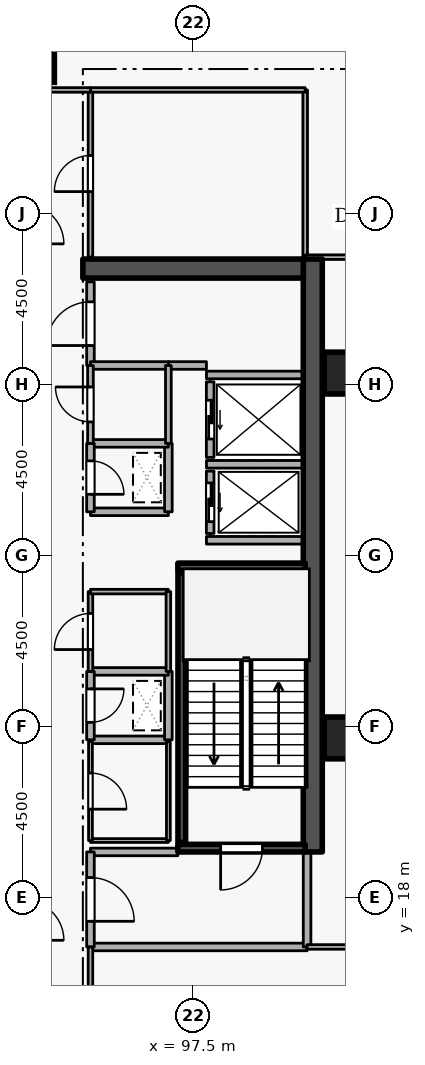
"""IFC4 building model, lengths in metres.
Left out: names, types, materials, properties, quantities, classifications, styles, units other than length and angle.
Written with IfcOpenShell. Run it as: python <this file> out.ifc"""

import sys

from ifc_helpers import new_model, si_unit, direction, frame, frame_2d, origin, origin_2d, place, context, subcontext, project, spatial, rectangle, extrude, element, fill, save


model = new_model("IFC4")
c1 = context("Model", 3, precision=1e-05, world=origin(), true_north=direction((0.0, 1.0)))
c2 = subcontext(c1, "Body", "Model", "MODEL_VIEW")
j1 = project(units=[si_unit("LENGTHUNIT", "METRE"), si_unit("PLANEANGLEUNIT", "RADIAN")], contexts=[c1])
p1 = place(None, origin())
s1 = spatial("IfcSite", under=j1, at=p1, CompositionType="ELEMENT")
p2 = place(p1, origin())
s2 = spatial("IfcBuilding", under=s1, at=p2, CompositionType="ELEMENT")
p3 = place(p2, frame((0.0, 0.0, 174.3)))
s3 = spatial("IfcBuildingStorey", under=s2, at=p3, CompositionType="ELEMENT", Elevation=174.3)
p4 = place(p3, frame((100.65, 19.2, 0.0), z_axis=(0.0, 0.0, 1.0), x_axis=(0.0, 1.0, 0.0)))
e1 = element("IfcWall", 1, at=p4, inside=s3, PredefinedType="SHEAR", context=c2, shape_type="SweptSolid", body=[
    extrude(rectangle(XDim=15.6, YDim=0.5, at=frame_2d((7.8, 0.0))), origin(), (0.0, 0.0, 1.0), 4.2),
])
p5 = place(p3, frame((94.6, 34.55, 0.0), z_axis=(0.0, 0.0, 1.0), x_axis=(1.0, 0.0, 0.0)))
e2 = element("IfcWall", 2, at=p5, inside=s3, PredefinedType="SHEAR", context=c2, shape_type="SweptSolid", body=[
    extrude(rectangle(XDim=5.8, YDim=0.5, at=frame_2d((2.9, 0.0))), origin(), (0.0, 0.0, 1.0), 4.2),
])
for number, where, z_axis, x_axis in (
    (3, (93.3, 40.0, 0.0), (0.0, 0.0, 1.0), (1.0, 0.0, 0.0)),
    (4, (101.5, 22.2, 0.0), (0.0, 0.0, 1.0), (1.0, 0.0, 0.0)),
    (5, (101.5, 31.8, 0.0), (0.0, 0.0, 1.0), (1.0, 0.0, 0.0)),
):
    element("IfcColumn", number, at=place(p3, frame(where, z_axis=z_axis, x_axis=x_axis)), inside=s3, PredefinedType="COLUMN", context=c2, shape_type="SweptSolid", body=[
        extrude(rectangle(XDim=1.1, YDim=1.1, at=origin_2d()), origin(), (0.0, 0.0, 1.0), 4.2),
    ])
p6 = place(p3, frame((97.95, 29.22, 0.0), z_axis=(0.0, 0.0, 1.0), x_axis=(0.0, -1.0, 0.0)))
e6 = element("IfcWall", 6, at=p6, inside=s3, PredefinedType="STANDARD", context=c2, shape_type="SweptSolid", body=[
    extrude(rectangle(XDim=1.64, YDim=0.2, at=frame_2d((0.82, 0.0))), origin(), (0.0, 0.0, 1.0), 3.94),
])
p7 = place(p6, frame((0.31, 0.0, 0.0)))
e7 = element("IfcOpeningElement", 7, at=p7, cuts=e6, PredefinedType="OPENING", context=c2, shape_type="SweptSolid", body=[
    extrude(rectangle(XDim=1.02, YDim=2.06, at=frame_2d((0.51, 1.03))), frame((0.0, 0.11, 0.0), z_axis=(0.0, -1.0, 0.0), x_axis=(1.0, 0.0, 0.0)), (0.0, 0.0, 1.0), 0.22),
])
p8 = place(p3, frame((97.95, 31.57, 0.0), z_axis=(0.0, 0.0, 1.0), x_axis=(0.0, -1.0, 0.0)))
e8 = element("IfcWall", 8, at=p8, inside=s3, PredefinedType="STANDARD", context=c2, shape_type="SweptSolid", body=[
    extrude(rectangle(XDim=1.99, YDim=0.2, at=frame_2d((0.995, 0.0))), origin(), (0.0, 0.0, 1.0), 3.94),
])
p9 = place(p8, frame((0.485, 0.0, 0.0)))
e9 = element("IfcOpeningElement", 9, at=p9, cuts=e8, PredefinedType="OPENING", context=c2, shape_type="SweptSolid", body=[
    extrude(rectangle(XDim=1.02, YDim=2.06, at=frame_2d((0.51, 1.03))), frame((0.0, 0.11, 0.0), z_axis=(0.0, -1.0, 0.0), x_axis=(1.0, 0.0, 0.0)), (0.0, 0.0, 1.0), 0.22),
])
for number, where, z_axis, x_axis in (
    (10, (97.852, 29.4, 0.0), (0.0, 0.0, 1.0), (1.0, 0.0, 0.0)),
    (11, (97.852, 27.4, 0.0), (0.0, 0.0, 1.0), (1.0, 0.0, 0.0)),
    (12, (97.852, 31.75, 0.0), (0.0, 0.0, 1.0), (1.0, 0.0, 0.0)),
):
    element("IfcWall", number, at=place(p3, frame(where, z_axis=z_axis, x_axis=x_axis)), inside=s3, PredefinedType="STANDARD", context=c2, shape_type="SweptSolid", body=[
        extrude(rectangle(XDim=2.536, YDim=0.2, at=frame_2d((1.268, 0.0))), origin(), (0.0, 0.0, 1.0), 3.94),
    ])
p10 = place(p3, frame((100.45, 19.3, 0.0), z_axis=(0.0, 0.0, 1.0), x_axis=(-1.0, 0.0, 0.0)))
e13 = element("IfcWall", 13, at=p10, inside=s3, PredefinedType="SHEAR", context=c2, shape_type="SweptSolid", body=[
    extrude(rectangle(XDim=3.35, YDim=0.2, at=frame_2d((1.675, 0.0))), origin(), (0.0, 0.0, 1.0), 4.2),
])
p11 = place(p10, frame((1.125, 0.0, 0.0)))
e14 = element("IfcOpeningElement", 14, at=p11, cuts=e13, PredefinedType="OPENING", context=c2, shape_type="SweptSolid", body=[
    extrude(rectangle(XDim=1.1, YDim=2.1, at=frame_2d((0.55, 1.05))), frame((0.0, 0.11, 0.0), z_axis=(0.0, -1.0, 0.0), x_axis=(1.0, 0.0, 0.0)), (0.0, 0.0, 1.0), 0.22),
])
p12 = place(p3, frame((97.1, 26.7, 0.0), z_axis=(0.0, 0.0, 1.0), x_axis=(1.0, 0.0, 0.0)))
e15 = element("IfcWall", 15, at=p12, inside=s3, PredefinedType="SHEAR", context=c2, shape_type="SweptSolid", body=[
    extrude(rectangle(XDim=3.35, YDim=0.2, at=frame_2d((1.675, 0.0))), origin(), (0.0, 0.0, 1.0), 4.2),
])
p13 = place(p3, frame((97.203, 26.55, 0.0), z_axis=(0.0, 0.0, 1.0), x_axis=(0.0, -1.0, 0.0)))
e16 = element("IfcWall", 16, at=p13, inside=s3, PredefinedType="SHEAR", context=c2, shape_type="SweptSolid", body=[
    extrude(rectangle(XDim=7.1, YDim=0.2, at=frame_2d((3.55, 0.0))), origin(), (0.0, 0.0, 1.0), 4.2),
])
p14 = place(p3, frame((94.8, 16.7, 0.0), z_axis=(0.0, 0.0, 1.0), x_axis=(1.0, 0.0, 0.0)))
e17 = element("IfcWall", 17, at=p14, inside=s3, PredefinedType="STANDARD", context=c2, shape_type="SweptSolid", body=[
    extrude(rectangle(XDim=5.7, YDim=0.2, at=frame_2d((2.85, 0.0))), origin(), (0.0, 0.0, 1.0), 3.94),
])
p15 = place(p3, frame((100.5, 16.7, 0.0), z_axis=(0.0, 0.0, 1.0), x_axis=(0.0, 1.0, 0.0)))
e18 = element("IfcWall", 18, at=p15, inside=s3, PredefinedType="STANDARD", context=c2, shape_type="SweptSolid", body=[
    extrude(rectangle(XDim=2.5, YDim=0.2, at=frame_2d((1.25, 0.0))), origin(), (0.0, 0.0, 1.0), 3.94),
])
p16 = place(p3, frame((97.1, 19.2, 0.0), z_axis=(0.0, 0.0, 1.0), x_axis=(-1.0, 0.0, 0.0)))
e19 = element("IfcWall", 19, at=p16, inside=s3, PredefinedType="STANDARD", context=c2, shape_type="SweptSolid", body=[
    extrude(rectangle(XDim=2.3, YDim=0.2, at=frame_2d((1.15, 0.0))), origin(), (0.0, 0.0, 1.0), 3.145),
])
p17 = place(p3, frame((94.8, 19.2, 0.0), z_axis=(0.0, 0.0, 1.0), x_axis=(0.0, -1.0, 0.0)))
e20 = element("IfcWall", 20, at=p17, inside=s3, PredefinedType="STANDARD", context=c2, shape_type="SweptSolid", body=[
    extrude(rectangle(XDim=2.5, YDim=0.2, at=frame_2d((1.25, 0.0))), origin(), (0.0, 0.0, 1.0), 3.94),
])
p18 = place(p17, frame((0.675, 0.0, 0.0)))
e21 = element("IfcOpeningElement", 21, at=p18, cuts=e20, PredefinedType="OPENING", context=c2, shape_type="SweptSolid", body=[
    extrude(rectangle(XDim=1.15, YDim=2.1, at=frame_2d((0.575, 1.05))), frame((0.0, 0.11, 0.0), z_axis=(0.0, -1.0, 0.0), x_axis=(1.0, 0.0, 0.0)), (0.0, 0.0, 1.0), 0.22),
])
p19 = place(p3, frame((94.8, 28.15, 0.0), z_axis=(0.0, 0.0, 1.0), x_axis=(1.0, 0.0, 0.0)))
e22 = element("IfcWall", 22, at=p19, inside=s3, PredefinedType="STANDARD", context=c2, shape_type="SweptSolid", body=[
    extrude(rectangle(XDim=2.05, YDim=0.2, at=frame_2d((1.025, 0.0))), origin(), (0.0, 0.0, 1.0), 3.94),
])
p20 = place(p3, frame((96.85, 28.15, 0.0), z_axis=(0.0, 0.0, 1.0), x_axis=(0.0, 1.0, 0.0)))
e23 = element("IfcWall", 23, at=p20, inside=s3, PredefinedType="STANDARD", context=c2, shape_type="SweptSolid", body=[
    extrude(rectangle(XDim=1.8, YDim=0.2, at=frame_2d((0.9, 0.0))), origin(), (0.0, 0.0, 1.0), 3.94),
])
p21 = place(p3, frame((96.85, 29.95, 0.0), z_axis=(0.0, 0.0, 1.0), x_axis=(-1.0, 0.0, 0.0)))
e24 = element("IfcWall", 24, at=p21, inside=s3, PredefinedType="STANDARD", context=c2, shape_type="SweptSolid", body=[
    extrude(rectangle(XDim=2.05, YDim=0.2, at=frame_2d((1.025, 0.0))), origin(), (0.0, 0.0, 1.0), 3.94),
])
p22 = place(p3, frame((94.8, 29.95, 0.0), z_axis=(0.0, 0.0, 1.0), x_axis=(0.0, -1.0, 0.0)))
e25 = element("IfcWall", 25, at=p22, inside=s3, PredefinedType="STANDARD", context=c2, shape_type="SweptSolid", body=[
    extrude(rectangle(XDim=1.8, YDim=0.2, at=frame_2d((0.9, 0.0))), origin(), (0.0, 0.0, 1.0), 3.94),
])
p23 = place(p22, frame((0.46, 0.0, 0.0)))
e26 = element("IfcOpeningElement", 26, at=p23, cuts=e25, PredefinedType="OPENING", context=c2, shape_type="SweptSolid", body=[
    extrude(rectangle(XDim=0.88, YDim=2.04, at=frame_2d((0.44, 1.02))), frame((0.0, 0.11, 0.0), z_axis=(0.0, -1.0, 0.0), x_axis=(1.0, 0.0, 0.0)), (0.0, 0.0, 1.0), 0.22),
])
p24 = place(p3, frame((94.8, 22.15, 0.0), z_axis=(0.0, 0.0, 1.0), x_axis=(1.0, 0.0, 0.0)))
e27 = element("IfcWall", 27, at=p24, inside=s3, PredefinedType="STANDARD", context=c2, shape_type="SweptSolid", body=[
    extrude(rectangle(XDim=2.05, YDim=0.2, at=frame_2d((1.025, 0.0))), origin(), (0.0, 0.0, 1.0), 3.94),
])
p25 = place(p3, frame((96.85, 22.15, 0.0), z_axis=(0.0, 0.0, 1.0), x_axis=(0.0, 1.0, 0.0)))
e28 = element("IfcWall", 28, at=p25, inside=s3, PredefinedType="STANDARD", context=c2, shape_type="SweptSolid", body=[
    extrude(rectangle(XDim=1.8, YDim=0.2, at=frame_2d((0.9, 0.0))), origin(), (0.0, 0.0, 1.0), 3.94),
])
p26 = place(p3, frame((96.85, 23.95, 0.0), z_axis=(0.0, 0.0, 1.0), x_axis=(-1.0, 0.0, 0.0)))
e29 = element("IfcWall", 29, at=p26, inside=s3, PredefinedType="STANDARD", context=c2, shape_type="SweptSolid", body=[
    extrude(rectangle(XDim=2.05, YDim=0.2, at=frame_2d((1.025, 0.0))), origin(), (0.0, 0.0, 1.0), 3.94),
])
p27 = place(p3, frame((94.8, 23.95, 0.0), z_axis=(0.0, 0.0, 1.0), x_axis=(0.0, -1.0, 0.0)))
e30 = element("IfcWall", 30, at=p27, inside=s3, PredefinedType="STANDARD", context=c2, shape_type="SweptSolid", body=[
    extrude(rectangle(XDim=1.8, YDim=0.2, at=frame_2d((0.9, 0.0))), origin(), (0.0, 0.0, 1.0), 3.94),
])
p28 = place(p27, frame((0.46, 0.0, 0.0)))
e31 = element("IfcOpeningElement", 31, at=p28, cuts=e30, PredefinedType="OPENING", context=c2, shape_type="SweptSolid", body=[
    extrude(rectangle(XDim=0.88, YDim=2.04, at=frame_2d((0.44, 1.02))), frame((0.0, 0.11, 0.0), z_axis=(0.0, -1.0, 0.0), x_axis=(1.0, 0.0, 0.0)), (0.0, 0.0, 1.0), 0.22),
])
p29 = place(p3, frame((94.8, 32.0, 0.0), z_axis=(0.0, 0.0, 1.0), x_axis=(0.0, 1.0, 0.0)))
e32 = element("IfcWall", 32, at=p29, inside=s3, PredefinedType="STANDARD", context=c2, shape_type="SweptSolid", body=[
    extrude(rectangle(XDim=2.2, YDim=0.2, at=frame_2d((1.1, 0.0))), origin(), (0.0, 0.0, 1.0), 3.94),
])
p30 = place(p29, frame((0.525, 0.0, 0.0)))
e33 = element("IfcOpeningElement", 33, at=p30, cuts=e32, PredefinedType="OPENING", context=c2, shape_type="SweptSolid", body=[
    extrude(rectangle(XDim=1.15, YDim=2.1, at=frame_2d((0.575, 1.05))), frame((0.0, 0.11, 0.0), z_axis=(0.0, -1.0, 0.0), x_axis=(1.0, 0.0, 0.0)), (0.0, 0.0, 1.0), 0.22),
])
p31 = place(p3, frame((97.852, 32.0, 0.0), z_axis=(0.0, 0.0, 1.0), x_axis=(-1.0, 0.0, 0.0)))
e34 = element("IfcWall", 34, at=p31, inside=s3, PredefinedType="STANDARD", context=c2, shape_type="SweptSolid", body=[
    extrude(rectangle(XDim=1.002, YDim=0.2, at=frame_2d((0.501, 0.0))), origin(), (0.0, 0.0, 1.0), 3.94),
])
p32 = place(p3, frame((96.85, 32.0, 0.0), z_axis=(0.0, 0.0, 1.0), x_axis=(-1.0, 0.0, 0.0)))
e35 = element("IfcWall", 35, at=p32, inside=s3, PredefinedType="STANDARD", context=c2, shape_type="SweptSolid", body=[
    extrude(rectangle(XDim=2.05, YDim=0.2, at=frame_2d((1.025, 0.0))), origin(), (0.0, 0.0, 1.0), 3.94),
])
p33 = place(p3, frame((94.8, 19.5, 0.0), z_axis=(0.0, 0.0, 1.0), x_axis=(1.0, 0.0, 0.0)))
e36 = element("IfcWall", 36, at=p33, inside=s3, PredefinedType="PARTITIONING", context=c2, shape_type="SweptSolid", body=[
    extrude(rectangle(XDim=2.05, YDim=0.1, at=frame_2d((1.025, 0.0))), origin(), (0.0, 0.0, 1.0), 3.145),
])
p34 = place(p3, frame((96.85, 19.5, 0.0), z_axis=(0.0, 0.0, 1.0), x_axis=(0.0, 1.0, 0.0)))
e37 = element("IfcWall", 37, at=p34, inside=s3, PredefinedType="PARTITIONING", context=c2, shape_type="SweptSolid", body=[
    extrude(rectangle(XDim=2.6, YDim=0.1, at=frame_2d((1.3, 0.0))), origin(), (0.0, 0.0, 1.0), 3.94),
])
p35 = place(p3, frame((94.8, 22.1, 0.0), z_axis=(0.0, 0.0, 1.0), x_axis=(0.0, -1.0, 0.0)))
e38 = element("IfcWall", 38, at=p35, inside=s3, PredefinedType="PARTITIONING", context=c2, shape_type="SweptSolid", body=[
    extrude(rectangle(XDim=2.6, YDim=0.1, at=frame_2d((1.3, 0.0))), origin(), (0.0, 0.0, 1.0), 3.94),
])
p36 = place(p35, frame((0.825, 0.0, 0.0)))
e39 = element("IfcOpeningElement", 39, at=p36, cuts=e38, PredefinedType="OPENING", context=c2, shape_type="SweptSolid", body=[
    extrude(rectangle(XDim=0.95, YDim=2.1, at=frame_2d((0.475, 1.05))), frame((0.0, 0.06, 0.0), z_axis=(0.0, -1.0, 0.0), x_axis=(1.0, 0.0, 0.0)), (0.0, 0.0, 1.0), 0.12),
])
p37 = place(p3, frame((94.8, 23.95, 0.0), z_axis=(0.0, 0.0, 1.0), x_axis=(0.0, 1.0, 0.0)))
e40 = element("IfcWall", 40, at=p37, inside=s3, PredefinedType="PARTITIONING", context=c2, shape_type="SweptSolid", body=[
    extrude(rectangle(XDim=2.1, YDim=0.12, at=frame_2d((1.05, 0.0))), origin(), (0.0, 0.0, 1.0), 3.94),
])
p38 = place(p37, frame((0.575, 0.0, 0.0)))
e41 = element("IfcOpeningElement", 41, at=p38, cuts=e40, PredefinedType="OPENING", context=c2, shape_type="SweptSolid", body=[
    extrude(rectangle(XDim=0.95, YDim=2.1, at=frame_2d((0.475, 1.05))), frame((0.0, 0.07, 0.0), z_axis=(0.0, -1.0, 0.0), x_axis=(1.0, 0.0, 0.0)), (0.0, 0.0, 1.0), 0.14),
])
p39 = place(p3, frame((94.8, 26.05, 0.0), z_axis=(0.0, 0.0, 1.0), x_axis=(1.0, 0.0, 0.0)))
e42 = element("IfcWall", 42, at=p39, inside=s3, PredefinedType="PARTITIONING", context=c2, shape_type="SweptSolid", body=[
    extrude(rectangle(XDim=2.05, YDim=0.12, at=frame_2d((1.025, 0.0))), origin(), (0.0, 0.0, 1.0), 3.94),
])
p40 = place(p3, frame((96.85, 26.05, 0.0), z_axis=(0.0, 0.0, 1.0), x_axis=(0.0, -1.0, 0.0)))
e43 = element("IfcWall", 43, at=p40, inside=s3, PredefinedType="PARTITIONING", context=c2, shape_type="SweptSolid", body=[
    extrude(rectangle(XDim=2.1, YDim=0.12, at=frame_2d((1.05, 0.0))), origin(), (0.0, 0.0, 1.0), 3.94),
])
p41 = place(p3, frame((94.8, 29.95, 0.0), z_axis=(0.0, 0.0, 1.0), x_axis=(0.0, 1.0, 0.0)))
e44 = element("IfcWall", 44, at=p41, inside=s3, PredefinedType="PARTITIONING", context=c2, shape_type="SweptSolid", body=[
    extrude(rectangle(XDim=2.05, YDim=0.15, at=frame_2d((1.025, 0.0))), origin(), (0.0, 0.0, 1.0), 3.94),
])
p42 = place(p41, frame((0.565, 0.0, 0.0)))
e45 = element("IfcOpeningElement", 45, at=p42, cuts=e44, PredefinedType="OPENING", context=c2, shape_type="SweptSolid", body=[
    extrude(rectangle(XDim=0.92, YDim=2.08, at=frame_2d((0.46, 1.04))), frame((0.0, 0.085, 0.0), z_axis=(0.0, -1.0, 0.0), x_axis=(1.0, 0.0, 0.0)), (0.0, 0.0, 1.0), 0.17),
])
p43 = place(p3, frame((96.85, 32.0, 0.0), z_axis=(0.0, 0.0, 1.0), x_axis=(0.0, -1.0, 0.0)))
e46 = element("IfcWall", 46, at=p43, inside=s3, PredefinedType="PARTITIONING", context=c2, shape_type="SweptSolid", body=[
    extrude(rectangle(XDim=2.05, YDim=0.15, at=frame_2d((1.025, 0.0))), origin(), (0.0, 0.0, 1.0), 3.94),
])
p44 = place(p3, frame((100.45, 39.25, 0.0), z_axis=(0.0, 0.0, 1.0), x_axis=(0.0, -1.0, 0.0)))
e47 = element("IfcWall", 47, at=p44, inside=s3, PredefinedType="PARTITIONING", context=c2, shape_type="SweptSolid", body=[
    extrude(rectangle(XDim=4.4, YDim=0.12, at=frame_2d((2.2, 0.0))), origin(), (0.0, 0.0, 1.0), 3.94),
])
p45 = place(p3, frame((94.8, 34.85, 0.0), z_axis=(0.0, 0.0, 1.0), x_axis=(0.0, 1.0, 0.0)))
e48 = element("IfcWall", 48, at=p45, inside=s3, PredefinedType="PARTITIONING", context=c2, shape_type="SweptSolid", body=[
    extrude(rectangle(XDim=4.4, YDim=0.12, at=frame_2d((2.2, 0.0))), origin(), (0.0, 0.0, 1.0), 3.94),
])
p46 = place(p45, frame((1.725, 0.0, 0.0)))
e49 = element("IfcOpeningElement", 49, at=p46, cuts=e48, PredefinedType="OPENING", context=c2, shape_type="SweptSolid", body=[
    extrude(rectangle(XDim=0.95, YDim=2.1, at=frame_2d((0.475, 1.05))), frame((0.0, 0.07, 0.0), z_axis=(0.0, -1.0, 0.0), x_axis=(1.0, 0.0, 0.0)), (0.0, 0.0, 1.0), 0.14),
])
p47 = place(p3, frame((94.8, 39.25, 0.0), z_axis=(0.0, 0.0, 1.0), x_axis=(1.0, 0.0, 0.0)))
e50 = element("IfcWall", 50, at=p47, inside=s3, PredefinedType="PARTITIONING", context=c2, shape_type="SweptSolid", body=[
    extrude(rectangle(XDim=5.65, YDim=0.12, at=frame_2d((2.825, 0.0))), origin(), (0.0, 0.0, 1.0), 3.94),
])
p48 = place(p3, frame((94.8, 14.75, 0.0), z_axis=(0.0, 0.0, 1.0), x_axis=(0.0, 1.0, 0.0)))
e51 = element("IfcWall", 51, at=p48, inside=s3, PredefinedType="PARTITIONING", context=c2, shape_type="SweptSolid", body=[
    extrude(rectangle(XDim=1.95, YDim=0.12, at=frame_2d((0.975, 0.0))), origin(), (0.0, 0.0, 1.0), 3.94),
])
p49 = place(p3, frame((100.5, 16.7, 0.0), z_axis=(0.0, 0.0, 1.0), x_axis=(1.0, 0.0, 0.0)))
e52 = element("IfcWall", 52, at=p49, inside=s3, PredefinedType="PARTITIONING", context=c2, shape_type="SweptSolid", body=[
    extrude(rectangle(XDim=5.72, YDim=0.12, at=frame_2d((2.86, 0.0))), origin(), (0.0, 0.0, 1.0), 3.94),
])
p50 = place(p3, frame((94.8, 39.25, 0.0), z_axis=(0.0, 0.0, 1.0), x_axis=(-1.0, 0.0, 0.0)))
e53 = element("IfcWall", 53, at=p50, inside=s3, PredefinedType="PARTITIONING", context=c2, shape_type="SweptSolid", body=[
    extrude(rectangle(XDim=1.75, YDim=0.12, at=frame_2d((0.875, 0.0))), origin(), (0.0, 0.0, 1.0), 3.94),
])
p51 = place(p3, frame((106.22, 34.85, 0.0), z_axis=(0.0, 0.0, 1.0), x_axis=(-1.0, 0.0, 0.0)))
e54 = element("IfcWall", 54, at=p51, inside=s3, PredefinedType="PARTITIONING", context=c2, shape_type="SweptSolid", body=[
    extrude(rectangle(XDim=5.77, YDim=0.12, at=frame_2d((2.885, 0.0))), origin(), (0.0, 0.0, 1.0), 3.145),
])
p52 = place(p7, origin())
e55 = element("IfcDoor", 55, at=p52, inside=s3, OperationType="SLIDING_TO_LEFT", PredefinedType="DOOR", context=c2, shape_type="SweptSolid", body=[
    extrude(rectangle(XDim=1.02, YDim=2.06, at=frame_2d((0.51, 1.03))), frame((0.0, 0.025, 0.0), z_axis=(0.0, -1.0, 0.0), x_axis=(1.0, 0.0, 0.0)), (0.0, 0.0, 1.0), 0.05),
])
fill(e7, e55)
p53 = place(p9, origin())
e56 = element("IfcDoor", 56, at=p53, inside=s3, OperationType="SLIDING_TO_LEFT", PredefinedType="DOOR", context=c2, shape_type="SweptSolid", body=[
    extrude(rectangle(XDim=1.02, YDim=2.06, at=frame_2d((0.51, 1.03))), frame((0.0, 0.025, 0.0), z_axis=(0.0, -1.0, 0.0), x_axis=(1.0, 0.0, 0.0)), (0.0, 0.0, 1.0), 0.05),
])
fill(e9, e56)
p54 = place(p11, origin())
e57 = element("IfcDoor", 57, at=p54, inside=s3, OperationType="SINGLE_SWING_RIGHT", PredefinedType="DOOR", context=c2, shape_type="SweptSolid", body=[
    extrude(rectangle(XDim=1.1, YDim=2.1, at=frame_2d((0.55, 1.05))), frame((0.0, 0.025, 0.0), z_axis=(0.0, -1.0, 0.0), x_axis=(1.0, 0.0, 0.0)), (0.0, 0.0, 1.0), 0.05),
])
fill(e14, e57)
p55 = place(p18, origin())
e58 = element("IfcDoor", 58, at=p55, inside=s3, OperationType="SINGLE_SWING_RIGHT", PredefinedType="DOOR", context=c2, shape_type="SweptSolid", body=[
    extrude(rectangle(XDim=1.15, YDim=2.1, at=frame_2d((0.575, 1.05))), frame((0.0, 0.025, 0.0), z_axis=(0.0, -1.0, 0.0), x_axis=(1.0, 0.0, 0.0)), (0.0, 0.0, 1.0), 0.05),
])
fill(e21, e58)
p56 = place(p23, origin())
e59 = element("IfcDoor", 59, at=p56, inside=s3, OperationType="SINGLE_SWING_RIGHT", PredefinedType="DOOR", context=c2, shape_type="SweptSolid", body=[
    extrude(rectangle(XDim=0.88, YDim=2.04, at=frame_2d((0.44, 1.02))), frame((0.0, 0.025, 0.0), z_axis=(0.0, -1.0, 0.0), x_axis=(1.0, 0.0, 0.0)), (0.0, 0.0, 1.0), 0.05),
])
fill(e26, e59)
p57 = place(p28, origin())
e60 = element("IfcDoor", 60, at=p57, inside=s3, OperationType="SINGLE_SWING_LEFT", PredefinedType="DOOR", context=c2, shape_type="SweptSolid", body=[
    extrude(rectangle(XDim=0.88, YDim=2.04, at=frame_2d((0.44, 1.02))), frame((0.0, 0.025, 0.0), z_axis=(0.0, -1.0, 0.0), x_axis=(1.0, 0.0, 0.0)), (0.0, 0.0, 1.0), 0.05),
])
fill(e31, e60)
p58 = place(p36, origin())
e61 = element("IfcDoor", 61, at=p58, inside=s3, OperationType="SINGLE_SWING_RIGHT", PredefinedType="DOOR", context=c2, shape_type="SweptSolid", body=[
    extrude(rectangle(XDim=0.95, YDim=2.1, at=frame_2d((0.475, 1.05))), frame((0.0, 0.025, 0.0), z_axis=(0.0, -1.0, 0.0), x_axis=(1.0, 0.0, 0.0)), (0.0, 0.0, 1.0), 0.05),
])
fill(e39, e61)
p59 = place(p38, origin())
e62 = element("IfcDoor", 62, at=p59, inside=s3, OperationType="SINGLE_SWING_LEFT", PredefinedType="DOOR", context=c2, shape_type="SweptSolid", body=[
    extrude(rectangle(XDim=0.95, YDim=2.1, at=frame_2d((0.475, 1.05))), frame((0.0, 0.025, 0.0), z_axis=(0.0, -1.0, 0.0), x_axis=(1.0, 0.0, 0.0)), (0.0, 0.0, 1.0), 0.05),
])
fill(e41, e62)
p60 = place(p42, origin())
e63 = element("IfcDoor", 63, at=p60, inside=s3, OperationType="SINGLE_SWING_RIGHT", PredefinedType="DOOR", context=c2, shape_type="SweptSolid", body=[
    extrude(rectangle(XDim=0.92, YDim=2.08, at=frame_2d((0.46, 1.04))), frame((0.0, 0.025, 0.0), z_axis=(0.0, -1.0, 0.0), x_axis=(1.0, 0.0, 0.0)), (0.0, 0.0, 1.0), 0.05),
])
fill(e45, e63)
p61 = place(p30, origin())
e64 = element("IfcDoor", 64, at=p61, inside=s3, OperationType="SINGLE_SWING_LEFT", PredefinedType="DOOR", context=c2, shape_type="SweptSolid", body=[
    extrude(rectangle(XDim=1.15, YDim=2.1, at=frame_2d((0.575, 1.05))), frame((0.0, 0.025, 0.0), z_axis=(0.0, -1.0, 0.0), x_axis=(1.0, 0.0, 0.0)), (0.0, 0.0, 1.0), 0.05),
])
fill(e33, e64)
p62 = place(p46, origin())
e65 = element("IfcDoor", 65, at=p62, inside=s3, OperationType="SINGLE_SWING_LEFT", PredefinedType="DOOR", context=c2, shape_type="SweptSolid", body=[
    extrude(rectangle(XDim=0.95, YDim=2.1, at=frame_2d((0.475, 1.05))), frame((0.0, 0.025, 0.0), z_axis=(0.0, -1.0, 0.0), x_axis=(1.0, 0.0, 0.0)), (0.0, 0.0, 1.0), 0.05),
])
fill(e49, e65)
save(model, sys.argv[1])
